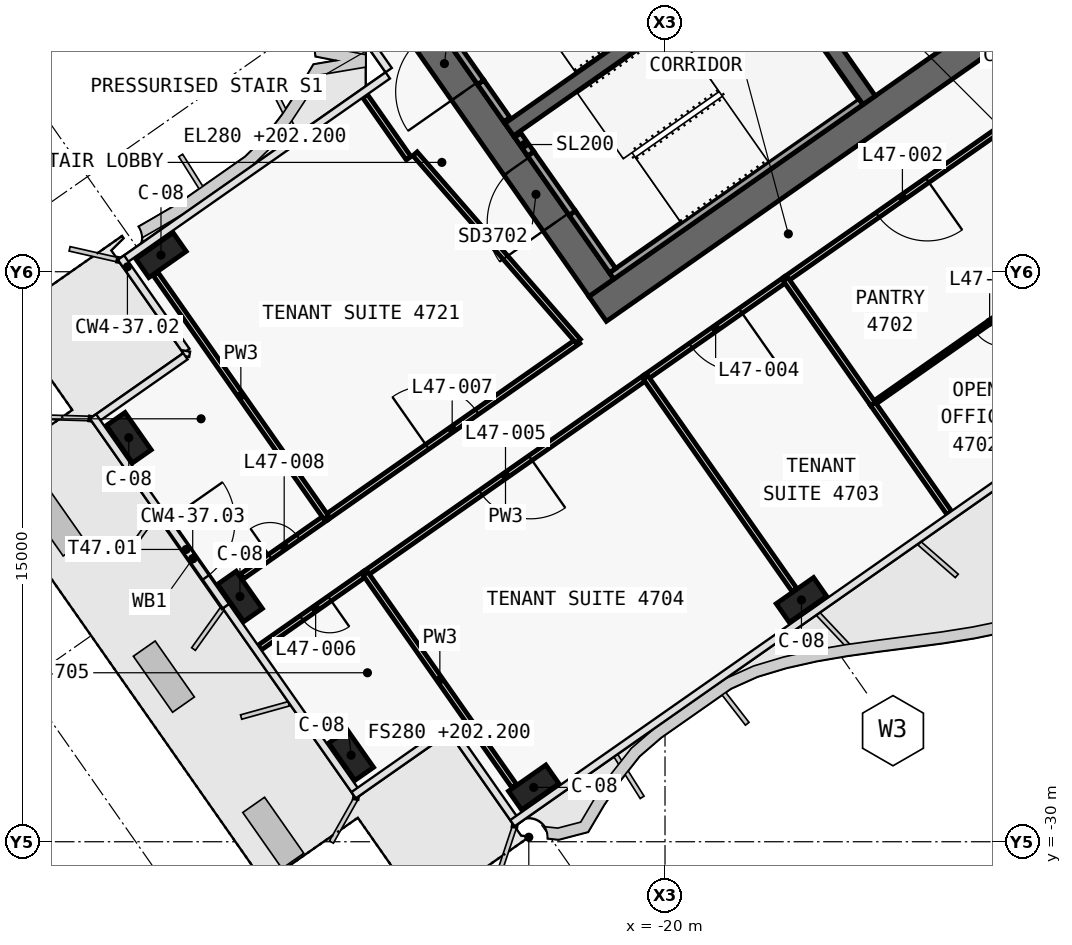
"""IFC4 building model, lengths in metres.
Left out: names, types, materials, properties, quantities, classifications, styles, units other than length and angle.
Written with IfcOpenShell. Run it as: python <this file> out.ifc"""

import sys

from ifc_helpers import new_model, si_unit, direction, frame, frame_2d, origin, origin_2d, place, context, subcontext, project, spatial, polyline, rectangle, outline, extrude, element, fill, save


model = new_model("IFC4")
c1 = context("Model", 3, precision=1e-05, world=origin(), true_north=direction((0.0, 1.0)))
c2 = subcontext(c1, "Body", "Model", "MODEL_VIEW")
j1 = project(units=[si_unit("LENGTHUNIT", "METRE"), si_unit("PLANEANGLEUNIT", "RADIAN")], contexts=[c1])
p1 = place(None, origin())
s1 = spatial("IfcSite", under=j1, at=p1, CompositionType="ELEMENT")
p2 = place(p1, origin())
s2 = spatial("IfcBuilding", under=s1, at=p2, CompositionType="ELEMENT")
p3 = place(p2, frame((0.0, 0.0, 202.2)))
s3 = spatial("IfcBuildingStorey", under=s2, at=p3, CompositionType="ELEMENT", Elevation=202.2)
p4 = place(p3, frame((0.029, -0.712, 0.0), z_axis=(0.0, 0.0, 1.0), x_axis=(-0.819151758019, -0.573576845187, 0.0)))
e1 = element("IfcWall", 1, at=p4, inside=s3, PredefinedType="SHEAR", context=c2, shape_type="SweptSolid", body=[
    extrude(outline(polyline([(26.616, 0.4), (0.56, 0.4), (-0.0, -0.4), (26.616, -0.4), (26.616, 0.4)])), origin(), (0.0, 0.0, 1.0), 3.9),
])
p5 = place(p4, frame((2.966, 0.0, 0.0)))
e2 = element("IfcOpeningElement", 2, at=p5, cuts=e1, PredefinedType="OPENING", context=c2, shape_type="SweptSolid", body=[
    extrude(rectangle(XDim=2.4, YDim=2.1, at=frame_2d((1.2, 1.05))), frame((0.0, 0.41, 0.0), z_axis=(0.0, -1.0, 0.0), x_axis=(1.0, 0.0, 0.0)), (0.0, 0.0, 1.0), 0.82),
])
p6 = place(p4, frame((11.916, 0.0, 0.0)))
e3 = element("IfcOpeningElement", 3, at=p6, cuts=e1, PredefinedType="OPENING", context=c2, shape_type="SweptSolid", body=[
    extrude(rectangle(XDim=2.4, YDim=2.1, at=frame_2d((1.2, 1.05))), frame((0.0, 0.41, 0.0), z_axis=(0.0, -1.0, 0.0), x_axis=(1.0, 0.0, 0.0)), (0.0, 0.0, 1.0), 0.82),
])
p7 = place(p3, frame((-21.675, -15.421, 0.0), z_axis=(0.0, 0.0, 1.0), x_axis=(-0.573581815061, 0.819148278049, 0.0)))
e4 = element("IfcWall", 4, at=p7, inside=s3, PredefinedType="SHEAR", context=c2, shape_type="SweptSolid", body=[
    extrude(outline(polyline([(0.0, 0.4), (0.0, -0.4), (9.6, -0.4), (9.6, 0.4), (0.0, 0.4)])), origin(), (0.0, 0.0, 1.0), 3.9),
])
p8 = place(p7, frame((6.3, 0.0, 0.0)))
e5 = element("IfcOpeningElement", 5, at=p8, cuts=e4, PredefinedType="OPENING", context=c2, shape_type="SweptSolid", body=[
    extrude(rectangle(XDim=1.8, YDim=2.1, at=frame_2d((0.9, 1.05))), frame((0.0, 0.41, 0.0), z_axis=(0.0, -1.0, 0.0), x_axis=(1.0, 0.0, 0.0)), (0.0, 0.0, 1.0), 0.82),
])
p9 = place(p7, frame((2.1, 0.0, 0.0)))
e6 = element("IfcOpeningElement", 6, at=p9, cuts=e4, PredefinedType="OPENING", context=c2, shape_type="SweptSolid", body=[
    extrude(rectangle(XDim=1.8, YDim=2.1, at=frame_2d((0.9, 1.05))), frame((0.0, 0.41, 0.0), z_axis=(0.0, -1.0, 0.0), x_axis=(1.0, 0.0, 0.0)), (0.0, 0.0, 1.0), 0.82),
])
p10 = place(p3, frame((-14.63, -10.488, 0.0), z_axis=(0.0, 0.0, 1.0), x_axis=(-0.573611936273, 0.819127185829, 0.0)))
e7 = element("IfcWall", 7, at=p10, inside=s3, PredefinedType="SHEAR", context=c2, shape_type="SweptSolid", body=[
    extrude(outline(polyline([(4.6, 0.2), (0.0, 0.2), (0.0, -0.2), (4.6, -0.2), (4.6, 0.2)])), origin(), (0.0, 0.0, 1.0), 3.9),
])
p11 = place(p3, frame((-2.638, 3.768, 0.0), z_axis=(0.0, 0.0, 1.0), x_axis=(-0.81915267502, -0.573575535572, 0.0)))
e8 = element("IfcWall", 8, at=p11, inside=s3, PredefinedType="SHEAR", context=c2, shape_type="SweptSolid", body=[
    extrude(outline(polyline([(26.2, 0.2), (0.0, 0.2), (0.0, -0.2), (26.2, -0.2), (26.2, 0.2)])), origin(), (0.0, 0.0, 1.0), 3.9),
])
p12 = place(p11, frame((1.169, 0.0, 0.0)))
e9 = element("IfcOpeningElement", 9, at=p12, cuts=e8, PredefinedType="OPENING", context=c2, shape_type="SweptSolid", body=[
    extrude(rectangle(XDim=1.1, YDim=2.1, at=frame_2d((0.55, 1.05))), frame((0.0, 0.21, 0.0), z_axis=(0.0, -1.0, 0.0), x_axis=(1.0, 0.0, 0.0)), (0.0, 0.0, 1.0), 0.42),
])
p13 = place(p11, frame((3.206, 0.0, 0.0)))
e10 = element("IfcOpeningElement", 10, at=p13, cuts=e8, PredefinedType="OPENING", context=c2, shape_type="SweptSolid", body=[
    extrude(rectangle(XDim=1.1, YDim=2.1, at=frame_2d((0.55, 1.05))), frame((0.0, 0.21, 0.0), z_axis=(0.0, -1.0, 0.0), x_axis=(1.0, 0.0, 0.0)), (0.0, 0.0, 1.0), 0.42),
])
p14 = place(p11, frame((5.244, 0.0, 0.0)))
e11 = element("IfcOpeningElement", 11, at=p14, cuts=e8, PredefinedType="OPENING", context=c2, shape_type="SweptSolid", body=[
    extrude(rectangle(XDim=1.1, YDim=2.1, at=frame_2d((0.55, 1.05))), frame((0.0, 0.21, 0.0), z_axis=(0.0, -1.0, 0.0), x_axis=(1.0, 0.0, 0.0)), (0.0, 0.0, 1.0), 0.42),
])
p15 = place(p11, frame((7.281, 0.0, 0.0)))
e12 = element("IfcOpeningElement", 12, at=p15, cuts=e8, PredefinedType="OPENING", context=c2, shape_type="SweptSolid", body=[
    extrude(rectangle(XDim=1.1, YDim=2.1, at=frame_2d((0.55, 1.05))), frame((0.0, 0.21, 0.0), z_axis=(0.0, -1.0, 0.0), x_axis=(1.0, 0.0, 0.0)), (0.0, 0.0, 1.0), 0.42),
])
p16 = place(p11, frame((9.688, 0.0, 0.0)))
e13 = element("IfcOpeningElement", 13, at=p16, cuts=e8, PredefinedType="OPENING", context=c2, shape_type="SweptSolid", body=[
    extrude(rectangle(XDim=1.1, YDim=2.1, at=frame_2d((0.55, 1.05))), frame((0.0, 0.21, 0.0), z_axis=(0.0, -1.0, 0.0), x_axis=(1.0, 0.0, 0.0)), (0.0, 0.0, 1.0), 0.42),
])
p17 = place(p11, frame((11.863, 0.0, 0.0)))
e14 = element("IfcOpeningElement", 14, at=p17, cuts=e8, PredefinedType="OPENING", context=c2, shape_type="SweptSolid", body=[
    extrude(rectangle(XDim=1.1, YDim=2.1, at=frame_2d((0.55, 1.05))), frame((0.0, 0.21, 0.0), z_axis=(0.0, -1.0, 0.0), x_axis=(1.0, 0.0, 0.0)), (0.0, 0.0, 1.0), 0.42),
])
p18 = place(p11, frame((15.175, 0.0, 0.0)))
e15 = element("IfcOpeningElement", 15, at=p18, cuts=e8, PredefinedType="OPENING", context=c2, shape_type="SweptSolid", body=[
    extrude(rectangle(XDim=1.0, YDim=2.1, at=frame_2d((0.5, 1.05))), frame((0.0, 0.21, 0.0), z_axis=(0.0, -1.0, 0.0), x_axis=(1.0, 0.0, 0.0)), (0.0, 0.0, 1.0), 0.42),
])
for number, where, z_axis, x_axis in (
    (16, (-16.41, -23.637, 0.0), (0.0, 0.0, 1.0), (-0.819, -0.574, 0.0)),
    (17, (-23.455, -28.57, 0.0), (0.0, 0.0, 1.0), (-0.819, -0.574, 0.0)),
    (18, (-33.263, -14.562, 0.0), (0.0, 0.0, 1.0), (-0.819, -0.574, 0.0)),
    (19, (-28.26, -27.723, 0.0), (0.0, 0.0, 1.0), (-0.574, 0.819, 0.0)),
    (20, (-31.185, -23.545, 0.0), (0.0, 0.0, 1.0), (-0.574, 0.819, 0.0)),
    (21, (-34.11, -19.367, 0.0), (0.0, 0.0, 1.0), (-0.574, 0.819, 0.0)),
):
    element("IfcColumn", number, at=place(p3, frame(where, z_axis=z_axis, x_axis=x_axis)), inside=s3, PredefinedType="COLUMN", context=c2, shape_type="SweptSolid", body=[
        extrude(rectangle(XDim=1.2, YDim=0.6, at=origin_2d()), origin(), (0.0, 0.0, 1.0), 3.9),
    ])
p19 = place(p3, frame((-24.162, -10.998, 0.0), z_axis=(0.0, 0.0, 1.0), x_axis=(-0.573612502218, 0.819126789514, 0.0)))
e22 = element("IfcWall", 22, at=p19, inside=s3, PredefinedType="SOLIDWALL", context=c2, shape_type="SweptSolid", body=[
    extrude(rectangle(XDim=1.2, YDim=0.2, at=frame_2d((0.6, 0.0))), origin(), (0.0, 0.0, 1.0), 3.62),
])
p20 = place(p3, frame((-24.85, -10.014, 2.15), z_axis=(0.0, 0.0, 1.0), x_axis=(-0.573505465124, 0.819201734296, 0.0)))
e23 = element("IfcWall", 23, at=p20, inside=s3, PredefinedType="SOLIDWALL", context=c2, shape_type="SweptSolid", body=[
    extrude(rectangle(XDim=1.9, YDim=0.2, at=frame_2d((0.95, 0.0))), origin(), (0.0, 0.0, 1.0), 1.47),
])
p21 = place(p3, frame((-14.851, -10.521, 0.0), z_axis=(0.0, 0.0, 1.0), x_axis=(-0.819141584393, -0.57359137434, 0.0)))
e24 = element("IfcWall", 24, at=p21, inside=s3, PredefinedType="SOLIDWALL", context=c2, shape_type="SweptSolid", body=[
    extrude(rectangle(XDim=8.0, YDim=0.2, at=frame_2d((4.0, 0.0))), origin(), (0.0, 0.0, 1.0), 3.62),
])
p22 = place(p3, frame((-21.38, -14.97, 0.0), z_axis=(0.0, 0.0, 1.0), x_axis=(-0.573559770908, 0.819163713305, 0.0)))
e25 = element("IfcWall", 25, at=p22, inside=s3, PredefinedType="SOLIDWALL", context=c2, shape_type="SweptSolid", body=[
    extrude(rectangle(XDim=1.85, YDim=0.2, at=frame_2d((0.925, 0.0))), origin(), (0.0, 0.0, 1.0), 3.62),
])
p23 = place(p3, frame((-23.531, -11.898, 0.0), z_axis=(0.0, 0.0, 1.0), x_axis=(-0.573708088123, 0.819059844958, 0.0)))
e26 = element("IfcWall", 26, at=p23, inside=s3, PredefinedType="SOLIDWALL", context=c2, shape_type="SweptSolid", body=[
    extrude(rectangle(XDim=0.6, YDim=0.2, at=frame_2d((0.3, 0.0))), origin(), (0.0, 0.0, 1.0), 3.62),
])
p24 = place(p3, frame((-22.441, -13.455, 2.15), z_axis=(0.0, 0.0, 1.0), x_axis=(-0.573591692345, 0.819141361715, 0.0)))
e27 = element("IfcWall", 27, at=p24, inside=s3, PredefinedType="SOLIDWALL", context=c2, shape_type="SweptSolid", body=[
    extrude(rectangle(XDim=1.9, YDim=0.2, at=frame_2d((0.95, 0.0))), origin(), (0.0, 0.0, 1.0), 1.47),
])
p25 = place(p3, frame((-33.286, -21.329, 0.0), z_axis=(0.0, 0.0, 1.0), x_axis=(0.573550025111, -0.819170537004, 0.0)))
e28 = element("IfcWall", 28, at=p25, inside=s3, PredefinedType="SOLIDWALL", context=c2, shape_type="SweptSolid", body=[
    extrude(rectangle(XDim=2.99, YDim=0.2, at=frame_2d((1.495, 0.0))), origin(), (0.0, 0.0, 1.0), 3.62),
])
p26 = place(p25, frame((0.295, 0.0, 0.0)))
e29 = element("IfcOpeningElement", 29, at=p26, cuts=e28, PredefinedType="OPENING", context=c2, shape_type="SweptSolid", body=[
    extrude(rectangle(XDim=1.8, YDim=2.4, at=frame_2d((0.9, 1.2))), frame((0.0, 0.11, 0.0), z_axis=(0.0, -1.0, 0.0), x_axis=(1.0, 0.0, 0.0)), (0.0, 0.0, 1.0), 0.22),
])
p27 = place(p3, frame((-28.917, -21.469, 0.0), z_axis=(0.0, 0.0, 1.0), x_axis=(0.819158271121, 0.57356754341, 0.0)))
e30 = element("IfcWall", 30, at=p27, inside=s3, PredefinedType="PARTITIONING", context=c2, shape_type="SweptSolid", body=[
    extrude(rectangle(XDim=8.099, YDim=0.15, at=frame_2d((4.049, 0.0))), origin(), (0.0, 0.0, 1.0), 3.0),
])
p28 = place(p27, frame((3.25, 0.0, 0.0)))
e31 = element("IfcOpeningElement", 31, at=p28, cuts=e30, PredefinedType="OPENING", context=c2, shape_type="SweptSolid", body=[
    extrude(rectangle(XDim=1.6, YDim=2.1, at=frame_2d((0.8, 1.05))), frame((0.0, 0.085, 0.0), z_axis=(0.0, -1.0, 0.0), x_axis=(1.0, 0.0, 0.0)), (0.0, 0.0, 1.0), 0.17),
])
p29 = place(p3, frame((-31.128, -23.017, 0.0), z_axis=(0.0, 0.0, 1.0), x_axis=(0.819155505936, 0.573571492575, 0.0)))
e32 = element("IfcWall", 32, at=p29, inside=s3, PredefinedType="PARTITIONING", context=c2, shape_type="SweptSolid", body=[
    extrude(rectangle(XDim=2.702, YDim=0.15, at=frame_2d((1.351, 0.0))), origin(), (0.0, 0.0, 1.0), 3.62),
])
p30 = place(p29, frame((0.901, 0.0, 0.0)))
e33 = element("IfcOpeningElement", 33, at=p30, cuts=e32, PredefinedType="OPENING", context=c2, shape_type="SweptSolid", body=[
    extrude(rectangle(XDim=0.9, YDim=2.1, at=frame_2d((0.45, 1.05))), frame((0.0, 0.085, 0.0), z_axis=(0.0, -1.0, 0.0), x_axis=(1.0, 0.0, 0.0)), (0.0, 0.0, 1.0), 0.17),
])
p31 = place(p3, frame((-10.68, -10.896, 0.0), z_axis=(0.0, 0.0, 1.0), x_axis=(-0.819138671238, -0.573595534573, 0.0)))
e34 = element("IfcWall", 34, at=p31, inside=s3, PredefinedType="PARTITIONING", context=c2, shape_type="SweptSolid", body=[
    extrude(rectangle(XDim=7.504, YDim=0.15, at=frame_2d((3.752, 0.0))), origin(), (0.0, 0.0, 1.0), 3.0),
])
p32 = place(p31, frame((2.952, 0.0, 0.0)))
e35 = element("IfcOpeningElement", 35, at=p32, cuts=e34, PredefinedType="OPENING", context=c2, shape_type="SweptSolid", body=[
    extrude(rectangle(XDim=1.6, YDim=2.1, at=frame_2d((0.8, 1.05))), frame((0.0, 0.085, 0.0), z_axis=(0.0, -1.0, 0.0), x_axis=(1.0, 0.0, 0.0)), (0.0, 0.0, 1.0), 0.17),
])
p33 = place(p3, frame((-16.823, -15.198, 0.0), z_axis=(0.0, 0.0, 1.0), x_axis=(-0.819165703328, -0.573556928727, 0.0)))
e36 = element("IfcWall", 36, at=p33, inside=s3, PredefinedType="PARTITIONING", context=c2, shape_type="SweptSolid", body=[
    extrude(rectangle(XDim=4.504, YDim=0.15, at=frame_2d((2.252, 0.0))), origin(), (0.0, 0.0, 1.0), 3.0),
])
p34 = place(p33, frame((1.452, 0.0, 0.0)))
e37 = element("IfcOpeningElement", 37, at=p34, cuts=e36, PredefinedType="OPENING", context=c2, shape_type="SweptSolid", body=[
    extrude(rectangle(XDim=1.6, YDim=2.1, at=frame_2d((0.8, 1.05))), frame((0.0, 0.085, 0.0), z_axis=(0.0, -1.0, 0.0), x_axis=(1.0, 0.0, 0.0)), (0.0, 0.0, 1.0), 0.17),
])
p35 = place(p3, frame((-20.51, -17.779, 0.0), z_axis=(0.0, 0.0, 1.0), x_axis=(-0.819142740634, -0.573589723117, 0.0)))
e38 = element("IfcWall", 38, at=p35, inside=s3, PredefinedType="PARTITIONING", context=c2, shape_type="SweptSolid", body=[
    extrude(rectangle(XDim=9.004, YDim=0.15, at=frame_2d((4.502, 0.0))), origin(), (0.0, 0.0, 1.0), 3.0),
])
p36 = place(p35, frame((3.702, 0.0, 0.0)))
e39 = element("IfcOpeningElement", 39, at=p36, cuts=e38, PredefinedType="OPENING", context=c2, shape_type="SweptSolid", body=[
    extrude(rectangle(XDim=1.6, YDim=2.1, at=frame_2d((0.8, 1.05))), frame((0.0, 0.085, 0.0), z_axis=(0.0, -1.0, 0.0), x_axis=(1.0, 0.0, 0.0)), (0.0, 0.0, 1.0), 0.17),
])
p37 = place(p3, frame((-27.882, -22.941, 0.0), z_axis=(0.0, 0.0, 1.0), x_axis=(-0.819147629048, -0.573582741917, 0.0)))
e40 = element("IfcWall", 40, at=p37, inside=s3, PredefinedType="PARTITIONING", context=c2, shape_type="SweptSolid", body=[
    extrude(rectangle(XDim=3.402, YDim=0.15, at=frame_2d((1.701, 0.0))), origin(), (0.0, 0.0, 1.0), 2.9),
])
p38 = place(p37, frame((1.151, 0.0, 0.0)))
e41 = element("IfcOpeningElement", 41, at=p38, cuts=e40, PredefinedType="OPENING", context=c2, shape_type="SweptSolid", body=[
    extrude(rectangle(XDim=0.9, YDim=2.1, at=frame_2d((0.45, 1.05))), frame((0.0, 0.085, 0.0), z_axis=(0.0, -1.0, 0.0), x_axis=(1.0, 0.0, 0.0)), (0.0, 0.0, 1.0), 0.17),
])
p39 = place(p3, frame((-26.746, -12.014, 0.0), z_axis=(0.0, 0.0, 1.0), x_axis=(-0.573568836472, 0.819157365729, 0.0)))
e42 = element("IfcWall", 42, at=p39, inside=s3, PredefinedType="PARTITIONING", context=c2, shape_type="SweptSolid", body=[
    extrude(rectangle(XDim=2.0, YDim=0.15, at=frame_2d((1.0, 0.0))), origin(), (0.0, 0.0, 1.0), 3.0),
])
p40 = place(p3, frame((-22.284, -16.826, 0.0), z_axis=(0.0, 0.0, 1.0), x_axis=(-0.656758142177, 0.754101281449, 0.0)))
e43 = element("IfcWall", 43, at=p40, inside=s3, PredefinedType="PARTITIONING", context=c2, shape_type="SweptSolid", body=[
    extrude(rectangle(XDim=6.539, YDim=0.15, at=frame_2d((3.269, 0.0))), origin(), (0.0, 0.0, 1.0), 3.62),
])
p41 = place(p3, frame((-28.916, -21.468, 0.0), z_axis=(0.0, 0.0, 1.0), x_axis=(-0.573558601227, 0.819164532288, 0.0)))
e44 = element("IfcWall", 44, at=p41, inside=s3, PredefinedType="PARTITIONING", context=c2, shape_type="SweptSolid", body=[
    extrude(rectangle(XDim=7.83, YDim=0.15, at=frame_2d((3.915, 0.0))), origin(), (0.0, 0.0, 1.0), 2.9),
])
p42 = place(p3, frame((-8.386, -14.175, 0.0), z_axis=(0.0, 0.0, 1.0), x_axis=(-0.81915238829, -0.573575945067, 0.0)))
e45 = element("IfcWall", 45, at=p42, inside=s3, PredefinedType="PARTITIONING", context=c2, shape_type="SweptSolid", body=[
    extrude(rectangle(XDim=7.5, YDim=0.1, at=frame_2d((3.75, 0.0))), origin(), (0.0, 0.0, 1.0), 3.0),
])
p43 = place(p42, frame((3.3, 0.0, 0.0)))
e46 = element("IfcOpeningElement", 46, at=p43, cuts=e45, PredefinedType="OPENING", context=c2, shape_type="SweptSolid", body=[
    extrude(rectangle(XDim=0.9, YDim=2.1, at=frame_2d((0.45, 1.05))), frame((0.0, 0.06, 0.0), z_axis=(0.0, -1.0, 0.0), x_axis=(1.0, 0.0, 0.0)), (0.0, 0.0, 1.0), 0.12),
])
p44 = place(p3, frame((-12.523, -21.343, 0.0), z_axis=(0.0, 0.0, 1.0), x_axis=(-0.573555999232, 0.819166354134, 0.0)))
e47 = element("IfcWall", 47, at=p44, inside=s3, PredefinedType="PARTITIONING", context=c2, shape_type="SweptSolid", body=[
    extrude(rectangle(XDim=3.499, YDim=0.15, at=frame_2d((1.75, 0.0))), origin(), (0.0, 0.0, 1.0), 2.9),
])
p45 = place(p3, frame((-14.531, -18.476, 0.0), z_axis=(0.0, 0.0, 1.0), x_axis=(-0.573626190743, 0.819117203636, 0.0)))
e48 = element("IfcWall", 48, at=p45, inside=s3, PredefinedType="PARTITIONING", context=c2, shape_type="SweptSolid", body=[
    extrude(rectangle(XDim=4.0, YDim=0.15, at=frame_2d((2.0, 0.0))), origin(), (0.0, 0.0, 1.0), 3.62),
])
p46 = place(p3, frame((-16.594, -23.375, 0.0), z_axis=(0.0, 0.0, 1.0), x_axis=(-0.573577493031, 0.819151304393, 0.0)))
e49 = element("IfcWall", 49, at=p46, inside=s3, PredefinedType="PARTITIONING", context=c2, shape_type="SweptSolid", body=[
    extrude(rectangle(XDim=6.83, YDim=0.15, at=frame_2d((3.415, 0.0))), origin(), (0.0, 0.0, 1.0), 3.0),
])
p47 = place(p3, frame((-23.966, -28.537, 0.0), z_axis=(0.0, 0.0, 1.0), x_axis=(-0.573601478058, 0.819134509327, 0.0)))
e50 = element("IfcWall", 50, at=p47, inside=s3, PredefinedType="PARTITIONING", context=c2, shape_type="SweptSolid", body=[
    extrude(rectangle(XDim=6.83, YDim=0.15, at=frame_2d((3.415, 0.0))), origin(), (0.0, 0.0, 1.0), 2.9),
])
p48 = place(p8, origin())
e51 = element("IfcDoor", 51, at=p48, inside=s3, OperationType="DOUBLE_DOOR_SINGLE_SWING", PredefinedType="DOOR", context=c2, shape_type="SweptSolid", body=[
    extrude(rectangle(XDim=1.8, YDim=2.1, at=frame_2d((0.9, 1.05))), frame((0.0, 0.025, 0.0), z_axis=(0.0, -1.0, 0.0), x_axis=(1.0, 0.0, 0.0)), (0.0, 0.0, 1.0), 0.05),
])
fill(e5, e51)
p49 = place(p9, origin())
e52 = element("IfcDoor", 52, at=p49, inside=s3, OperationType="DOUBLE_DOOR_SINGLE_SWING", PredefinedType="DOOR", context=c2, shape_type="SweptSolid", body=[
    extrude(rectangle(XDim=1.8, YDim=2.1, at=frame_2d((0.9, 1.05))), frame((0.0, 0.025, 0.0), z_axis=(0.0, -1.0, 0.0), x_axis=(1.0, 0.0, 0.0)), (0.0, 0.0, 1.0), 0.05),
])
fill(e6, e52)
p50 = place(p26, origin())
e53 = element("IfcDoor", 53, at=p50, inside=s3, OperationType="DOUBLE_DOOR_DOUBLE_SWING", PredefinedType="DOOR", context=c2, shape_type="SweptSolid", body=[
    extrude(rectangle(XDim=1.8, YDim=2.4, at=frame_2d((0.9, 1.2))), frame((0.0, 0.025, 0.0), z_axis=(0.0, -1.0, 0.0), x_axis=(1.0, 0.0, 0.0)), (0.0, 0.0, 1.0), 0.05),
])
fill(e29, e53)
p51 = place(p32, origin())
e54 = element("IfcDoor", 54, at=p51, inside=s3, OperationType="DOUBLE_DOOR_SINGLE_SWING", PredefinedType="DOOR", context=c2, shape_type="SweptSolid", body=[
    extrude(rectangle(XDim=1.6, YDim=2.1, at=frame_2d((0.8, 1.05))), frame((0.0, 0.025, 0.0), z_axis=(0.0, -1.0, 0.0), x_axis=(1.0, 0.0, 0.0)), (0.0, 0.0, 1.0), 0.05),
])
fill(e35, e54)
p52 = place(p43, origin())
e55 = element("IfcDoor", 55, at=p52, inside=s3, OperationType="SINGLE_SWING_LEFT", PredefinedType="DOOR", context=c2, shape_type="SweptSolid", body=[
    extrude(rectangle(XDim=0.9, YDim=2.1, at=frame_2d((0.45, 1.05))), frame((0.0, 0.025, 0.0), z_axis=(0.0, -1.0, 0.0), x_axis=(1.0, 0.0, 0.0)), (0.0, 0.0, 1.0), 0.05),
])
fill(e46, e55)
p53 = place(p34, origin())
e56 = element("IfcDoor", 56, at=p53, inside=s3, OperationType="DOUBLE_DOOR_SINGLE_SWING", PredefinedType="DOOR", context=c2, shape_type="SweptSolid", body=[
    extrude(rectangle(XDim=1.6, YDim=2.1, at=frame_2d((0.8, 1.05))), frame((0.0, 0.025, 0.0), z_axis=(0.0, -1.0, 0.0), x_axis=(1.0, 0.0, 0.0)), (0.0, 0.0, 1.0), 0.05),
])
fill(e37, e56)
p54 = place(p36, origin())
e57 = element("IfcDoor", 57, at=p54, inside=s3, OperationType="DOUBLE_DOOR_SINGLE_SWING", PredefinedType="DOOR", context=c2, shape_type="SweptSolid", body=[
    extrude(rectangle(XDim=1.6, YDim=2.1, at=frame_2d((0.8, 1.05))), frame((0.0, 0.025, 0.0), z_axis=(0.0, -1.0, 0.0), x_axis=(1.0, 0.0, 0.0)), (0.0, 0.0, 1.0), 0.05),
])
fill(e39, e57)
p55 = place(p38, origin())
e58 = element("IfcDoor", 58, at=p55, inside=s3, OperationType="SINGLE_SWING_RIGHT", PredefinedType="DOOR", context=c2, shape_type="SweptSolid", body=[
    extrude(rectangle(XDim=0.9, YDim=2.1, at=frame_2d((0.45, 1.05))), frame((0.0, 0.025, 0.0), z_axis=(0.0, -1.0, 0.0), x_axis=(1.0, 0.0, 0.0)), (0.0, 0.0, 1.0), 0.05),
])
fill(e41, e58)
p56 = place(p28, origin())
e59 = element("IfcDoor", 59, at=p56, inside=s3, OperationType="DOUBLE_DOOR_SINGLE_SWING", PredefinedType="DOOR", context=c2, shape_type="SweptSolid", body=[
    extrude(rectangle(XDim=1.6, YDim=2.1, at=frame_2d((0.8, 1.05))), frame((0.0, 0.025, 0.0), z_axis=(0.0, -1.0, 0.0), x_axis=(1.0, 0.0, 0.0)), (0.0, 0.0, 1.0), 0.05),
])
fill(e31, e59)
p57 = place(p30, origin())
e60 = element("IfcDoor", 60, at=p57, inside=s3, OperationType="SINGLE_SWING_RIGHT", PredefinedType="DOOR", context=c2, shape_type="SweptSolid", body=[
    extrude(rectangle(XDim=0.9, YDim=2.1, at=frame_2d((0.45, 1.05))), frame((0.0, 0.025, 0.0), z_axis=(0.0, -1.0, 0.0), x_axis=(1.0, 0.0, 0.0)), (0.0, 0.0, 1.0), 0.05),
])
fill(e33, e60)
save(model, sys.argv[1])
